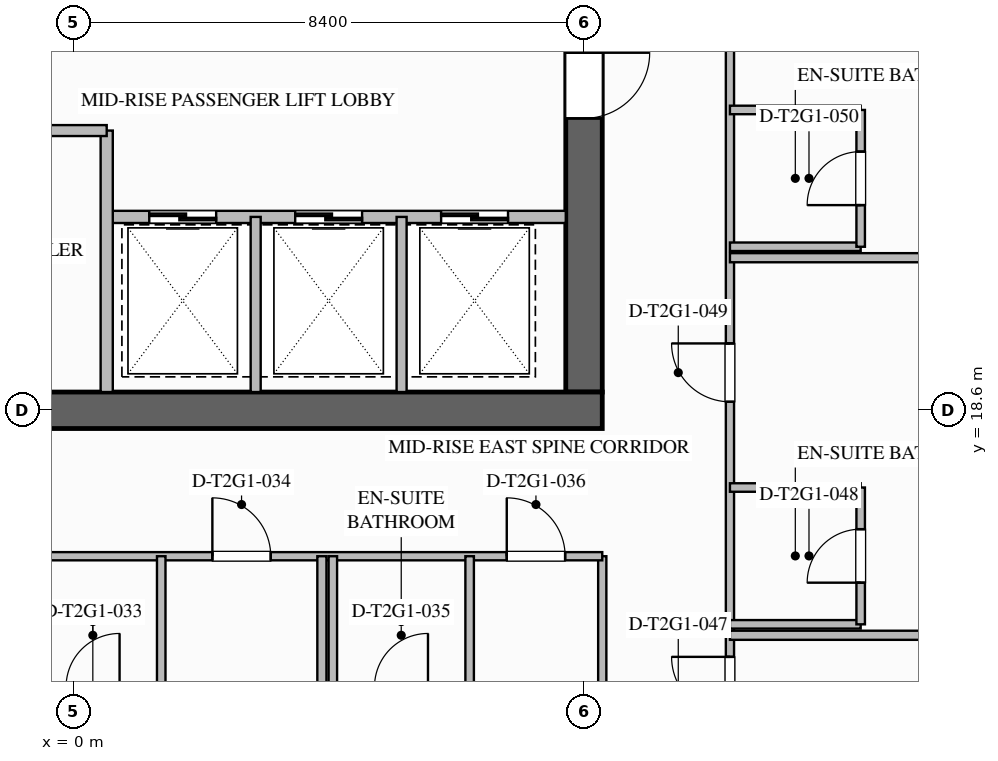
"""IFC4 building model, lengths in metres.
Left out: names, types, materials, properties, quantities, classifications, styles, units other than length and angle.
Written with IfcOpenShell. Run it as: python <this file> out.ifc"""

import sys

from ifc_helpers import new_model, si_unit, direction, frame, frame_2d, origin, place, context, subcontext, project, spatial, rectangle, extrude, element, fill, save


model = new_model("IFC4")
c1 = context("Model", 3, precision=1e-05, world=origin(), true_north=direction((0.0, 1.0)))
c2 = subcontext(c1, "Body", "Model", "MODEL_VIEW")
j1 = project(units=[si_unit("LENGTHUNIT", "METRE"), si_unit("PLANEANGLEUNIT", "RADIAN")], contexts=[c1])
p1 = place(None, origin())
s1 = spatial("IfcSite", under=j1, at=p1, CompositionType="ELEMENT")
p2 = place(p1, origin())
s2 = spatial("IfcBuilding", under=s1, at=p2, CompositionType="ELEMENT")
p3 = place(p2, frame((0.0, 0.0, 91.8)))
s3 = spatial("IfcBuildingStorey", under=s2, at=p3, CompositionType="ELEMENT", Elevation=91.8)
p4 = place(p3, frame((8.4, 35.1, 0.0), z_axis=(0.0, 0.0, 1.0), x_axis=(0.0, -1.0, 0.0)))
e1 = element("IfcWall", 1, at=p4, inside=s3, PredefinedType="SHEAR", context=c2, shape_type="SweptSolid", body=[
    extrude(rectangle(XDim=16.2, YDim=0.6, at=frame_2d((8.1, 0.0))), origin(), (0.0, 0.0, 1.0), 3.5),
])
p5 = place(p4, frame((3.08, 0.0, 0.0)))
e2 = element("IfcOpeningElement", 2, at=p5, cuts=e1, PredefinedType="OPENING", context=c2, shape_type="SweptSolid", body=[
    extrude(rectangle(XDim=1.12, YDim=2.1, at=frame_2d((0.56, 1.05))), frame((0.0, 0.31, 0.0), z_axis=(0.0, -1.0, 0.0), x_axis=(1.0, 0.0, 0.0)), (0.0, 0.0, 1.0), 0.62),
])
p6 = place(p4, frame((10.62, 0.0, 0.0)))
e3 = element("IfcOpeningElement", 3, at=p6, cuts=e1, PredefinedType="OPENING", context=c2, shape_type="SweptSolid", body=[
    extrude(rectangle(XDim=1.08, YDim=2.04, at=frame_2d((0.54, 1.02))), frame((0.0, 0.31, 0.0), z_axis=(0.0, -1.0, 0.0), x_axis=(1.0, 0.0, 0.0)), (0.0, 0.0, 1.0), 0.62),
])
p7 = place(p3, frame((8.7, 18.6, 0.0), z_axis=(0.0, 0.0, 1.0), x_axis=(-1.0, 0.0, 0.0)))
e4 = element("IfcWall", 4, at=p7, inside=s3, PredefinedType="SHEAR", context=c2, shape_type="SweptSolid", body=[
    extrude(rectangle(XDim=17.4, YDim=0.6, at=frame_2d((8.7, 0.0))), origin(), (0.0, 0.0, 1.0), 3.5),
])
p8 = place(p3, frame((8.1, 21.78, 0.0), z_axis=(0.0, 0.0, 1.0), x_axis=(-1.0, 0.0, 0.0)))
e5 = element("IfcWall", 5, at=p8, inside=s3, PredefinedType="SOLIDWALL", context=c2, shape_type="SweptSolid", body=[
    extrude(rectangle(XDim=7.55, YDim=0.2, at=frame_2d((3.775, 0.0))), origin(), (0.0, 0.0, 1.0), 3.24),
])
p9 = place(p8, frame((5.75, 0.0, 0.0)))
e6 = element("IfcOpeningElement", 6, at=p9, cuts=e5, PredefinedType="OPENING", context=c2, shape_type="SweptSolid", body=[
    extrude(rectangle(XDim=1.1, YDim=2.2, at=frame_2d((0.55, 1.1))), frame((0.0, 0.11, 0.0), z_axis=(0.0, -1.0, 0.0), x_axis=(1.0, 0.0, 0.0)), (0.0, 0.0, 1.0), 0.22),
])
p10 = place(p8, frame((3.35, 0.0, 0.0)))
e7 = element("IfcOpeningElement", 7, at=p10, cuts=e5, PredefinedType="OPENING", context=c2, shape_type="SweptSolid", body=[
    extrude(rectangle(XDim=1.1, YDim=2.2, at=frame_2d((0.55, 1.1))), frame((0.0, 0.11, 0.0), z_axis=(0.0, -1.0, 0.0), x_axis=(1.0, 0.0, 0.0)), (0.0, 0.0, 1.0), 0.22),
])
p11 = place(p8, frame((0.95, 0.0, 0.0)))
e8 = element("IfcOpeningElement", 8, at=p11, cuts=e5, PredefinedType="OPENING", context=c2, shape_type="SweptSolid", body=[
    extrude(rectangle(XDim=1.1, YDim=2.2, at=frame_2d((0.55, 1.1))), frame((0.0, 0.11, 0.0), z_axis=(0.0, -1.0, 0.0), x_axis=(1.0, 0.0, 0.0)), (0.0, 0.0, 1.0), 0.22),
])
p12 = place(p3, frame((0.55, 18.9, 0.0), z_axis=(0.0, 0.0, 1.0), x_axis=(0.0, 1.0, 0.0)))
e9 = element("IfcWall", 9, at=p12, inside=s3, PredefinedType="SOLIDWALL", context=c2, shape_type="SweptSolid", body=[
    extrude(rectangle(XDim=4.3, YDim=0.2, at=frame_2d((2.15, 0.0))), origin(), (0.0, 0.0, 1.0), 3.24),
])
for number, where, z_axis, x_axis in (
    (10, (3.0, 18.9, 0.0), (0.0, 0.0, 1.0), (0.0, 1.0, 0.0)),
    (11, (5.4, 18.9, 0.0), (0.0, 0.0, 1.0), (0.0, 1.0, 0.0)),
):
    element("IfcWall", number, at=place(p3, frame(where, z_axis=z_axis, x_axis=x_axis)), inside=s3, PredefinedType="PARTITIONING", context=c2, shape_type="SweptSolid", body=[
        extrude(rectangle(XDim=2.88, YDim=0.165, at=frame_2d((1.44, 0.0))), origin(), (0.0, 0.0, 1.0), 3.24),
    ])
p13 = place(p3, frame((-8.1, 23.2, 0.0), z_axis=(0.0, 0.0, 1.0), x_axis=(1.0, 0.0, 0.0)))
e12 = element("IfcWall", 12, at=p13, inside=s3, PredefinedType="SOLIDWALL", context=c2, shape_type="SweptSolid", body=[
    extrude(rectangle(XDim=8.65, YDim=0.18, at=frame_2d((4.325, 0.0))), origin(), (0.0, 0.0, 1.0), 3.24),
])
p14 = place(p13, frame((1.6, 0.0, 0.0)))
e13 = element("IfcOpeningElement", 13, at=p14, cuts=e12, PredefinedType="OPENING", context=c2, shape_type="SweptSolid", body=[
    extrude(rectangle(XDim=1.0, YDim=2.1, at=frame_2d((0.5, 1.05))), frame((0.0, 0.1, 0.0), z_axis=(0.0, -1.0, 0.0), x_axis=(1.0, 0.0, 0.0)), (0.0, 0.0, 1.0), 0.2),
])
p15 = place(p13, frame((6.2, 0.0, 0.0)))
e14 = element("IfcOpeningElement", 14, at=p15, cuts=e12, PredefinedType="OPENING", context=c2, shape_type="SweptSolid", body=[
    extrude(rectangle(XDim=1.0, YDim=2.1, at=frame_2d((0.5, 1.05))), frame((0.0, 0.1, 0.0), z_axis=(0.0, -1.0, 0.0), x_axis=(1.0, 0.0, 0.0)), (0.0, 0.0, 1.0), 0.2),
])
p16 = place(p3, frame((8.7, 10.8, 0.0), z_axis=(0.0, 0.0, 1.0), x_axis=(0.0, 1.0, 0.0)))
e15 = element("IfcWall", 15, at=p16, inside=s3, PredefinedType="PARTITIONING", context=c2, shape_type="SweptSolid", body=[
    extrude(rectangle(XDim=5.4, YDim=0.135, at=frame_2d((2.7, 0.0))), origin(), (0.0, 0.0, 1.0), 3.24),
])
p17 = place(p3, frame((-16.2, 16.2, 0.0), z_axis=(0.0, 0.0, 1.0), x_axis=(1.0, 0.0, 0.0)))
e16 = element("IfcWall", 16, at=p17, inside=s3, PredefinedType="PARTITIONING", context=c2, shape_type="SweptSolid", body=[
    extrude(rectangle(XDim=24.9, YDim=0.135, at=frame_2d((12.45, 0.0))), origin(), (0.0, 0.0, 1.0), 3.24),
])
p18 = place(p17, frame((3.271, 0.0, 0.0)))
e17 = element("IfcOpeningElement", 17, at=p18, cuts=e16, PredefinedType="OPENING", context=c2, shape_type="SweptSolid", body=[
    extrude(rectangle(XDim=0.96, YDim=2.15, at=frame_2d((0.48, 1.075))), frame((0.0, 0.077, 0.0), z_axis=(0.0, -1.0, 0.0), x_axis=(1.0, 0.0, 0.0)), (0.0, 0.0, 1.0), 0.155),
])
p19 = place(p17, frame((8.113, 0.0, 0.0)))
e18 = element("IfcOpeningElement", 18, at=p19, cuts=e16, PredefinedType="OPENING", context=c2, shape_type="SweptSolid", body=[
    extrude(rectangle(XDim=0.96, YDim=2.15, at=frame_2d((0.48, 1.075))), frame((0.0, 0.077, 0.0), z_axis=(0.0, -1.0, 0.0), x_axis=(1.0, 0.0, 0.0)), (0.0, 0.0, 1.0), 0.155),
])
p20 = place(p17, frame((13.035, 0.0, 0.0)))
e19 = element("IfcOpeningElement", 19, at=p20, cuts=e16, PredefinedType="OPENING", context=c2, shape_type="SweptSolid", body=[
    extrude(rectangle(XDim=1.26, YDim=2.2, at=frame_2d((0.63, 1.1))), frame((0.0, 0.077, 0.0), z_axis=(0.0, -1.0, 0.0), x_axis=(1.0, 0.0, 0.0)), (0.0, 0.0, 1.0), 0.155),
])
p21 = place(p17, frame((18.488, 0.0, 0.0)))
e20 = element("IfcOpeningElement", 20, at=p21, cuts=e16, PredefinedType="OPENING", context=c2, shape_type="SweptSolid", body=[
    extrude(rectangle(XDim=0.96, YDim=2.15, at=frame_2d((0.48, 1.075))), frame((0.0, 0.077, 0.0), z_axis=(0.0, -1.0, 0.0), x_axis=(1.0, 0.0, 0.0)), (0.0, 0.0, 1.0), 0.155),
])
p22 = place(p17, frame((23.329, 0.0, 0.0)))
e21 = element("IfcOpeningElement", 21, at=p22, cuts=e16, PredefinedType="OPENING", context=c2, shape_type="SweptSolid", body=[
    extrude(rectangle(XDim=0.96, YDim=2.15, at=frame_2d((0.48, 1.075))), frame((0.0, 0.077, 0.0), z_axis=(0.0, -1.0, 0.0), x_axis=(1.0, 0.0, 0.0)), (0.0, 0.0, 1.0), 0.155),
])
p23 = place(p3, frame((10.8, 10.8, 0.0), z_axis=(0.0, 0.0, 1.0), x_axis=(0.0, 1.0, 0.0)))
e22 = element("IfcWall", 22, at=p23, inside=s3, PredefinedType="PARTITIONING", context=c2, shape_type="SweptSolid", body=[
    extrude(rectangle(XDim=32.4, YDim=0.135, at=frame_2d((16.2, 0.0))), origin(), (0.0, 0.0, 1.0), 3.24),
])
p24 = place(p23, frame((2.785, 0.0, 0.0)))
e23 = element("IfcOpeningElement", 23, at=p24, cuts=e22, PredefinedType="OPENING", context=c2, shape_type="SweptSolid", body=[
    extrude(rectangle(XDim=0.96, YDim=2.15, at=frame_2d((0.48, 1.075))), frame((0.0, 0.077, 0.0), z_axis=(0.0, -1.0, 0.0), x_axis=(1.0, 0.0, 0.0)), (0.0, 0.0, 1.0), 0.155),
])
p25 = place(p23, frame((7.939, 0.0, 0.0)))
e24 = element("IfcOpeningElement", 24, at=p25, cuts=e22, PredefinedType="OPENING", context=c2, shape_type="SweptSolid", body=[
    extrude(rectangle(XDim=0.96, YDim=2.15, at=frame_2d((0.48, 1.075))), frame((0.0, 0.077, 0.0), z_axis=(0.0, -1.0, 0.0), x_axis=(1.0, 0.0, 0.0)), (0.0, 0.0, 1.0), 0.155),
])
p26 = place(p23, frame((13.99, 0.0, 0.0)))
e25 = element("IfcOpeningElement", 25, at=p26, cuts=e22, PredefinedType="OPENING", context=c2, shape_type="SweptSolid", body=[
    extrude(rectangle(XDim=0.96, YDim=2.15, at=frame_2d((0.48, 1.075))), frame((0.0, 0.077, 0.0), z_axis=(0.0, -1.0, 0.0), x_axis=(1.0, 0.0, 0.0)), (0.0, 0.0, 1.0), 0.155),
])
p27 = place(p23, frame((18.635, 0.0, 0.0)))
e26 = element("IfcOpeningElement", 26, at=p27, cuts=e22, PredefinedType="OPENING", context=c2, shape_type="SweptSolid", body=[
    extrude(rectangle(XDim=1.02, YDim=2.15, at=frame_2d((0.51, 1.075))), frame((0.0, 0.077, 0.0), z_axis=(0.0, -1.0, 0.0), x_axis=(1.0, 0.0, 0.0)), (0.0, 0.0, 1.0), 0.155),
])
p28 = place(p23, frame((25.281, 0.0, 0.0)))
e27 = element("IfcOpeningElement", 27, at=p28, cuts=e22, PredefinedType="OPENING", context=c2, shape_type="SweptSolid", body=[
    extrude(rectangle(XDim=0.96, YDim=2.15, at=frame_2d((0.48, 1.075))), frame((0.0, 0.077, 0.0), z_axis=(0.0, -1.0, 0.0), x_axis=(1.0, 0.0, 0.0)), (0.0, 0.0, 1.0), 0.155),
])
p29 = place(p23, frame((30.435, 0.0, 0.0)))
e28 = element("IfcOpeningElement", 28, at=p29, cuts=e22, PredefinedType="OPENING", context=c2, shape_type="SweptSolid", body=[
    extrude(rectangle(XDim=0.96, YDim=2.15, at=frame_2d((0.48, 1.075))), frame((0.0, 0.077, 0.0), z_axis=(0.0, -1.0, 0.0), x_axis=(1.0, 0.0, 0.0)), (0.0, 0.0, 1.0), 0.155),
])
p30 = place(p3, frame((1.447, 16.2, 0.0), z_axis=(0.0, 0.0, 1.0), x_axis=(0.0, -1.0, 0.0)))
e29 = element("IfcWall", 29, at=p30, inside=s3, PredefinedType="PLUMBINGWALL", context=c2, shape_type="SweptSolid", body=[
    extrude(rectangle(XDim=2.15, YDim=0.14, at=frame_2d((1.075, 0.0))), origin(), (0.0, 0.0, 1.0), 3.24),
])
p31 = place(p3, frame((4.089, 0.12, 0.0), z_axis=(0.0, 0.0, 1.0), x_axis=(0.0, 1.0, 0.0)))
e30 = element("IfcWall", 30, at=p31, inside=s3, PredefinedType="PARTITIONING", context=c2, shape_type="SweptSolid", body=[
    extrude(rectangle(XDim=16.08, YDim=0.15, at=frame_2d((8.04, 0.0))), origin(), (0.0, 0.0, 1.0), 3.24),
])
for number, where, z_axis, x_axis in (
    (31, (4.269, 16.2, 0.0), (0.0, 0.0, 1.0), (0.0, -1.0, 0.0)),
    (32, (6.519, 16.2, 0.0), (0.0, 0.0, 1.0), (0.0, -1.0, 0.0)),
):
    element("IfcWall", number, at=place(p3, frame(where, z_axis=z_axis, x_axis=x_axis)), inside=s3, PredefinedType="PLUMBINGWALL", context=c2, shape_type="SweptSolid", body=[
        extrude(rectangle(XDim=2.15, YDim=0.14, at=frame_2d((1.075, 0.0))), origin(), (0.0, 0.0, 1.0), 3.24),
    ])
p32 = place(p3, frame((10.8, 14.9, 0.0), z_axis=(0.0, 0.0, 1.0), x_axis=(1.0, 0.0, 0.0)))
e33 = element("IfcWall", 33, at=p32, inside=s3, PredefinedType="PARTITIONING", context=c2, shape_type="SweptSolid", body=[
    extrude(rectangle(XDim=11.28, YDim=0.15, at=frame_2d((5.64, 0.0))), origin(), (0.0, 0.0, 1.0), 2.765),
])
for number, where, z_axis, x_axis in (
    (34, (10.8, 15.08, 0.0), (0.0, 0.0, 1.0), (1.0, 0.0, 0.0)),
    (35, (10.8, 17.33, 0.0), (0.0, 0.0, 1.0), (1.0, 0.0, 0.0)),
):
    element("IfcWall", number, at=place(p3, frame(where, z_axis=z_axis, x_axis=x_axis)), inside=s3, PredefinedType="PLUMBINGWALL", context=c2, shape_type="SweptSolid", body=[
        extrude(rectangle(XDim=2.15, YDim=0.14, at=frame_2d((1.075, 0.0))), origin(), (0.0, 0.0, 1.0), 3.24),
    ])
p33 = place(p3, frame((12.95, 15.08, 0.0), z_axis=(0.0, 0.0, 1.0), x_axis=(0.0, 1.0, 0.0)))
e36 = element("IfcWall", 36, at=p33, inside=s3, PredefinedType="PLUMBINGWALL", context=c2, shape_type="SweptSolid", body=[
    extrude(rectangle(XDim=2.25, YDim=0.14, at=frame_2d((1.125, 0.0))), origin(), (0.0, 0.0, 1.0), 3.24),
])
p34 = place(p33, frame((0.685, 0.0, 0.0)))
e37 = element("IfcOpeningElement", 37, at=p34, cuts=e36, PredefinedType="OPENING", context=c2, shape_type="SweptSolid", body=[
    extrude(rectangle(XDim=0.88, YDim=2.1, at=frame_2d((0.44, 1.05))), frame((0.0, 0.08, 0.0), z_axis=(0.0, -1.0, 0.0), x_axis=(1.0, 0.0, 0.0)), (0.0, 0.0, 1.0), 0.16),
])
p35 = place(p3, frame((10.8, 21.109, 0.0), z_axis=(0.0, 0.0, 1.0), x_axis=(1.0, 0.0, 0.0)))
e38 = element("IfcWall", 38, at=p35, inside=s3, PredefinedType="PARTITIONING", context=c2, shape_type="SweptSolid", body=[
    extrude(rectangle(XDim=11.28, YDim=0.15, at=frame_2d((5.64, 0.0))), origin(), (0.0, 0.0, 1.0), 3.24),
])
for number, where, z_axis, x_axis in (
    (39, (10.8, 21.289, 0.0), (0.0, 0.0, 1.0), (1.0, 0.0, 0.0)),
    (40, (10.8, 23.539, 0.0), (0.0, 0.0, 1.0), (1.0, 0.0, 0.0)),
):
    element("IfcWall", number, at=place(p3, frame(where, z_axis=z_axis, x_axis=x_axis)), inside=s3, PredefinedType="PLUMBINGWALL", context=c2, shape_type="SweptSolid", body=[
        extrude(rectangle(XDim=2.15, YDim=0.14, at=frame_2d((1.075, 0.0))), origin(), (0.0, 0.0, 1.0), 3.24),
    ])
p36 = place(p3, frame((12.95, 21.289, 0.0), z_axis=(0.0, 0.0, 1.0), x_axis=(0.0, 1.0, 0.0)))
e41 = element("IfcWall", 41, at=p36, inside=s3, PredefinedType="PLUMBINGWALL", context=c2, shape_type="SweptSolid", body=[
    extrude(rectangle(XDim=2.25, YDim=0.14, at=frame_2d((1.125, 0.0))), origin(), (0.0, 0.0, 1.0), 3.24),
])
p37 = place(p36, frame((0.685, 0.0, 0.0)))
e42 = element("IfcOpeningElement", 42, at=p37, cuts=e41, PredefinedType="OPENING", context=c2, shape_type="SweptSolid", body=[
    extrude(rectangle(XDim=0.88, YDim=2.1, at=frame_2d((0.44, 1.05))), frame((0.0, 0.08, 0.0), z_axis=(0.0, -1.0, 0.0), x_axis=(1.0, 0.0, 0.0)), (0.0, 0.0, 1.0), 0.16),
])
p38 = place(p9, origin())
e43 = element("IfcDoor", 43, at=p38, inside=s3, OperationType="SLIDING_TO_LEFT", PredefinedType="DOOR", context=c2, shape_type="SweptSolid", body=[
    extrude(rectangle(XDim=1.1, YDim=2.2, at=frame_2d((0.55, 1.1))), frame((0.0, 0.025, 0.0), z_axis=(0.0, -1.0, 0.0), x_axis=(1.0, 0.0, 0.0)), (0.0, 0.0, 1.0), 0.05),
])
fill(e6, e43)
p39 = place(p10, origin())
e44 = element("IfcDoor", 44, at=p39, inside=s3, OperationType="SLIDING_TO_LEFT", PredefinedType="DOOR", context=c2, shape_type="SweptSolid", body=[
    extrude(rectangle(XDim=1.1, YDim=2.2, at=frame_2d((0.55, 1.1))), frame((0.0, 0.025, 0.0), z_axis=(0.0, -1.0, 0.0), x_axis=(1.0, 0.0, 0.0)), (0.0, 0.0, 1.0), 0.05),
])
fill(e7, e44)
p40 = place(p11, origin())
e45 = element("IfcDoor", 45, at=p40, inside=s3, OperationType="SLIDING_TO_LEFT", PredefinedType="DOOR", context=c2, shape_type="SweptSolid", body=[
    extrude(rectangle(XDim=1.1, YDim=2.2, at=frame_2d((0.55, 1.1))), frame((0.0, 0.025, 0.0), z_axis=(0.0, -1.0, 0.0), x_axis=(1.0, 0.0, 0.0)), (0.0, 0.0, 1.0), 0.05),
])
fill(e8, e45)
p41 = place(p6, origin())
e46 = element("IfcDoor", 46, at=p41, inside=s3, OperationType="SINGLE_SWING_LEFT", PredefinedType="DOOR", context=c2, shape_type="SweptSolid", body=[
    extrude(rectangle(XDim=1.08, YDim=2.04, at=frame_2d((0.54, 1.02))), frame((0.0, 0.025, 0.0), z_axis=(0.0, -1.0, 0.0), x_axis=(1.0, 0.0, 0.0)), (0.0, 0.0, 1.0), 0.05),
])
fill(e3, e46)
p42 = place(p21, origin())
e47 = element("IfcDoor", 47, at=p42, inside=s3, OperationType="SINGLE_SWING_LEFT", PredefinedType="DOOR", context=c2, shape_type="SweptSolid", body=[
    extrude(rectangle(XDim=0.96, YDim=2.15, at=frame_2d((0.48, 1.075))), frame((0.0, 0.025, 0.0), z_axis=(0.0, -1.0, 0.0), x_axis=(1.0, 0.0, 0.0)), (0.0, 0.0, 1.0), 0.05),
])
fill(e20, e47)
p43 = place(p22, origin())
e48 = element("IfcDoor", 48, at=p43, inside=s3, OperationType="SINGLE_SWING_LEFT", PredefinedType="DOOR", context=c2, shape_type="SweptSolid", body=[
    extrude(rectangle(XDim=0.96, YDim=2.15, at=frame_2d((0.48, 1.075))), frame((0.0, 0.025, 0.0), z_axis=(0.0, -1.0, 0.0), x_axis=(1.0, 0.0, 0.0)), (0.0, 0.0, 1.0), 0.05),
])
fill(e21, e48)
p44 = place(p24, origin())
e49 = element("IfcDoor", 49, at=p44, inside=s3, OperationType="SINGLE_SWING_RIGHT", PredefinedType="DOOR", context=c2, shape_type="SweptSolid", body=[
    extrude(rectangle(XDim=0.96, YDim=2.15, at=frame_2d((0.48, 1.075))), frame((0.0, 0.025, 0.0), z_axis=(0.0, -1.0, 0.0), x_axis=(1.0, 0.0, 0.0)), (0.0, 0.0, 1.0), 0.05),
])
fill(e23, e49)
p45 = place(p34, origin())
e50 = element("IfcDoor", 50, at=p45, inside=s3, OperationType="SINGLE_SWING_LEFT", PredefinedType="DOOR", context=c2, shape_type="SweptSolid", body=[
    extrude(rectangle(XDim=0.88, YDim=2.1, at=frame_2d((0.44, 1.05))), frame((0.0, 0.025, 0.0), z_axis=(0.0, -1.0, 0.0), x_axis=(1.0, 0.0, 0.0)), (0.0, 0.0, 1.0), 0.05),
])
fill(e37, e50)
p46 = place(p25, origin())
e51 = element("IfcDoor", 51, at=p46, inside=s3, OperationType="SINGLE_SWING_RIGHT", PredefinedType="DOOR", context=c2, shape_type="SweptSolid", body=[
    extrude(rectangle(XDim=0.96, YDim=2.15, at=frame_2d((0.48, 1.075))), frame((0.0, 0.025, 0.0), z_axis=(0.0, -1.0, 0.0), x_axis=(1.0, 0.0, 0.0)), (0.0, 0.0, 1.0), 0.05),
])
fill(e24, e51)
p47 = place(p37, origin())
e52 = element("IfcDoor", 52, at=p47, inside=s3, OperationType="SINGLE_SWING_LEFT", PredefinedType="DOOR", context=c2, shape_type="SweptSolid", body=[
    extrude(rectangle(XDim=0.88, YDim=2.1, at=frame_2d((0.44, 1.05))), frame((0.0, 0.025, 0.0), z_axis=(0.0, -1.0, 0.0), x_axis=(1.0, 0.0, 0.0)), (0.0, 0.0, 1.0), 0.05),
])
fill(e42, e52)
save(model, sys.argv[1])
